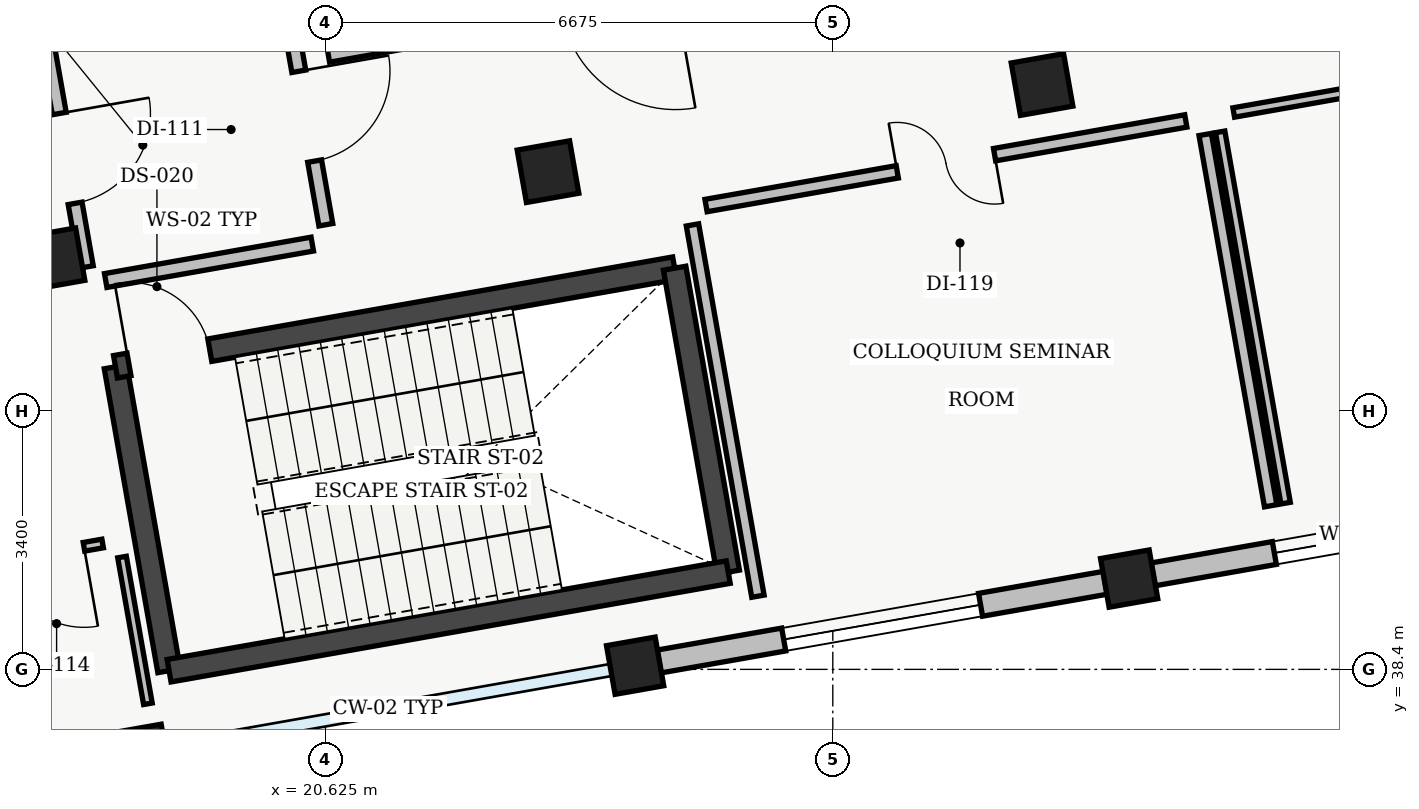
"""IFC4 building model, lengths in metres.
Left out: names, types, materials, properties, quantities, classifications, styles, units other than length and angle.
Written with IfcOpenShell. Run it as: python <this file> out.ifc"""

import sys

from ifc_helpers import new_model, si_unit, direction, frame, frame_2d, origin, origin_2d, place, context, subcontext, project, spatial, rectangle, extrude, element, fill, save


model = new_model("IFC4")
c1 = context("Model", 3, precision=1e-05, world=origin(), true_north=direction((0.0, 1.0)))
c2 = subcontext(c1, "Body", "Model", "MODEL_VIEW")
j1 = project(units=[si_unit("LENGTHUNIT", "METRE"), si_unit("PLANEANGLEUNIT", "RADIAN")], contexts=[c1])
p1 = place(None, origin())
s1 = spatial("IfcSite", under=j1, at=p1, CompositionType="ELEMENT")
p2 = place(p1, origin())
s2 = spatial("IfcBuilding", under=s1, at=p2, CompositionType="ELEMENT")
p3 = place(p2, frame((0.0, 0.0, 23.1)))
s3 = spatial("IfcBuildingStorey", under=s2, at=p3, CompositionType="ELEMENT", Elevation=23.1)
p4 = place(p3, frame((18.199, 37.302, 0.0), z_axis=(0.0, 0.0, 1.0), x_axis=(0.984807753012, 0.173648177667, 0.0)))
e1 = element("IfcColumn", 1, at=p4, inside=s3, PredefinedType="COLUMN", context=c2, shape_type="SweptSolid", body=[
    extrude(rectangle(XDim=0.65, YDim=0.65, at=origin_2d()), origin(), (0.0, 0.0, 1.0), 4.31),
])
p5 = place(p3, frame((17.053, 43.802, 0.0), z_axis=(0.0, 0.0, 1.0), x_axis=(0.984807753012, 0.173648177667, 0.0)))
e2 = element("IfcColumn", 2, at=p5, inside=s3, PredefinedType="COLUMN", context=c2, shape_type="SweptSolid", body=[
    extrude(rectangle(XDim=0.7, YDim=0.7, at=origin_2d()), origin(), (0.0, 0.0, 1.0), 4.31),
])
p6 = place(p3, frame((24.699, 38.448, 0.0), z_axis=(0.0, 0.0, 1.0), x_axis=(0.984807753012, 0.173648177667, 0.0)))
e3 = element("IfcColumn", 3, at=p6, inside=s3, PredefinedType="COLUMN", context=c2, shape_type="SweptSolid", body=[
    extrude(rectangle(XDim=0.65, YDim=0.65, at=origin_2d()), origin(), (0.0, 0.0, 1.0), 4.31),
])
p7 = place(p3, frame((23.553, 44.948, 0.0), z_axis=(0.0, 0.0, 1.0), x_axis=(0.984807753012, 0.173648177667, 0.0)))
e4 = element("IfcColumn", 4, at=p7, inside=s3, PredefinedType="COLUMN", context=c2, shape_type="SweptSolid", body=[
    extrude(rectangle(XDim=0.7, YDim=0.7, at=origin_2d()), origin(), (0.0, 0.0, 1.0), 4.31),
])
p8 = place(p3, frame((31.199, 39.594, 0.0), z_axis=(0.0, 0.0, 1.0), x_axis=(0.984807753012, 0.173648177667, 0.0)))
e5 = element("IfcColumn", 5, at=p8, inside=s3, PredefinedType="COLUMN", context=c2, shape_type="SweptSolid", body=[
    extrude(rectangle(XDim=0.65, YDim=0.65, at=origin_2d()), origin(), (0.0, 0.0, 1.0), 4.31),
])
p9 = place(p3, frame((30.053, 46.094, 0.0), z_axis=(0.0, 0.0, 1.0), x_axis=(0.984807753012, 0.173648177667, 0.0)))
e6 = element("IfcColumn", 6, at=p9, inside=s3, PredefinedType="COLUMN", context=c2, shape_type="SweptSolid", body=[
    extrude(rectangle(XDim=0.7, YDim=0.7, at=origin_2d()), origin(), (0.0, 0.0, 1.0), 4.31),
])
p10 = place(p3, frame((37.384, 40.685, 0.0), z_axis=(0.0, 0.0, 1.0), x_axis=(-0.98480829201, -0.173645120828, 0.0)))
e7 = element("IfcWall", 7, at=p10, inside=s3, PredefinedType="STANDARD", context=c2, shape_type="SweptSolid", body=[
    extrude(rectangle(XDim=5.96, YDim=0.305, at=frame_2d((2.98, 0.0))), origin(), (0.0, 0.0, 1.0), 3.795),
])
p11 = place(p10, frame((1.62, 0.0, 0.95)))
e8 = element("IfcOpeningElement", 8, at=p11, cuts=e7, PredefinedType="OPENING", context=c2, shape_type="SweptSolid", body=[
    extrude(rectangle(XDim=2.72, YDim=1.44, at=frame_2d((1.36, 0.72))), frame((0.0, 0.152, 0.0), z_axis=(0.0, -1.0, 0.0), x_axis=(1.0, 0.0, 0.0)), (0.0, 0.0, 1.0), 0.305),
])
p12 = place(p3, frame((30.884, 39.539, 0.0), z_axis=(0.0, 0.0, 1.0), x_axis=(-0.98480829201, -0.173645120828, 0.0)))
e9 = element("IfcWall", 9, at=p12, inside=s3, PredefinedType="STANDARD", context=c2, shape_type="SweptSolid", body=[
    extrude(rectangle(XDim=5.96, YDim=0.305, at=frame_2d((2.98, 0.0))), origin(), (0.0, 0.0, 1.0), 3.795),
])
p13 = place(p12, frame((1.665, 0.0, 0.95)))
e10 = element("IfcOpeningElement", 10, at=p13, cuts=e9, PredefinedType="OPENING", context=c2, shape_type="SweptSolid", body=[
    extrude(rectangle(XDim=2.63, YDim=1.42, at=frame_2d((1.315, 0.71))), frame((0.0, 0.152, 0.0), z_axis=(0.0, -1.0, 0.0), x_axis=(1.0, 0.0, 0.0)), (0.0, 0.0, 1.0), 0.305),
])
p14 = place(p3, frame((18.567, 38.383, 0.0), z_axis=(0.0, 0.0, 1.0), x_axis=(-0.173606946886, 0.984815022221, 0.0)))
e11 = element("IfcWall", 11, at=p14, inside=s3, PredefinedType="SHEAR", context=c2, shape_type="SweptSolid", body=[
    extrude(rectangle(XDim=4.06, YDim=0.3, at=frame_2d((2.03, 0.0))), origin(), (0.0, 0.0, 1.0), 4.28),
])
p15 = place(p3, frame((17.863, 42.381, 0.0), z_axis=(0.0, 0.0, 1.0), x_axis=(0.984808225754, 0.173645496596, 0.0)))
e12 = element("IfcWall", 12, at=p15, inside=s3, PredefinedType="SHEAR", context=c2, shape_type="SweptSolid", body=[
    extrude(rectangle(XDim=7.47, YDim=0.3, at=frame_2d((3.735, 0.0))), origin(), (0.0, 0.0, 1.0), 4.28),
])
p16 = place(p15, frame((0.18, 0.0, 0.0)))
e13 = element("IfcOpeningElement", 13, at=p16, cuts=e12, PredefinedType="OPENING", context=c2, shape_type="SweptSolid", body=[
    extrude(rectangle(XDim=1.08, YDim=2.15, at=frame_2d((0.54, 1.075))), frame((0.0, 0.15, 0.0), z_axis=(0.0, -1.0, 0.0), x_axis=(1.0, 0.0, 0.0)), (0.0, 0.0, 1.0), 0.3),
])
p17 = place(p3, frame((25.219, 43.678, 0.0), z_axis=(0.0, 0.0, 1.0), x_axis=(0.173665267602, -0.984804739443, 0.0)))
e14 = element("IfcWall", 14, at=p17, inside=s3, PredefinedType="SHEAR", context=c2, shape_type="SweptSolid", body=[
    extrude(rectangle(XDim=4.06, YDim=0.3, at=frame_2d((2.03, 0.0))), origin(), (0.0, 0.0, 1.0), 4.28),
])
p18 = place(p3, frame((25.924, 39.68, 0.0), z_axis=(0.0, 0.0, 1.0), x_axis=(-0.984809211193, -0.173639907711, 0.0)))
e15 = element("IfcWall", 15, at=p18, inside=s3, PredefinedType="SHEAR", context=c2, shape_type="SweptSolid", body=[
    extrude(rectangle(XDim=7.47, YDim=0.3, at=frame_2d((3.735, 0.0))), origin(), (0.0, 0.0, 1.0), 4.28),
])
p19 = place(p3, frame((17.733, 43.516, 0.0), z_axis=(0.0, 0.0, 1.0), x_axis=(0.984808483292, 0.173644035992, 0.0)))
e16 = element("IfcWall", 16, at=p19, inside=s3, PredefinedType="SOLIDWALL", context=c2, shape_type="SweptSolid", body=[
    extrude(rectangle(XDim=2.76, YDim=0.185, at=frame_2d((1.38, 0.0))), origin(), (0.0, 0.0, 1.0), 3.95),
])
p20 = place(p3, frame((20.63, 44.25, 0.0), z_axis=(0.0, 0.0, 1.0), x_axis=(-0.173621956536, 0.984812376145, 0.0)))
e17 = element("IfcWall", 17, at=p20, inside=s3, PredefinedType="SOLIDWALL", context=c2, shape_type="SweptSolid", body=[
    extrude(rectangle(XDim=3.41, YDim=0.185, at=frame_2d((1.705, 0.0))), origin(), (0.0, 0.0, 1.0), 3.95),
])
p21 = place(p20, frame((0.85, 0.0, 0.0)))
e18 = element("IfcOpeningElement", 18, at=p21, cuts=e17, PredefinedType="OPENING", context=c2, shape_type="SweptSolid", body=[
    extrude(rectangle(XDim=1.2, YDim=2.15, at=frame_2d((0.6, 1.075))), frame((0.0, 0.093, 0.0), z_axis=(0.0, -1.0, 0.0), x_axis=(1.0, 0.0, 0.0)), (0.0, 0.0, 1.0), 0.185),
])
p22 = place(p3, frame((16.886, 47.052, 0.0), z_axis=(0.0, 0.0, 1.0), x_axis=(0.173621956536, -0.984812376145, 0.0)))
e19 = element("IfcWall", 19, at=p22, inside=s3, PredefinedType="SOLIDWALL", context=c2, shape_type="SweptSolid", body=[
    extrude(rectangle(XDim=3.41, YDim=0.185, at=frame_2d((1.705, 0.0))), origin(), (0.0, 0.0, 1.0), 3.95),
])
p23 = place(p22, frame((1.36, 0.0, 0.0)))
e20 = element("IfcOpeningElement", 20, at=p23, cuts=e19, PredefinedType="OPENING", context=c2, shape_type="SweptSolid", body=[
    extrude(rectangle(XDim=1.2, YDim=2.15, at=frame_2d((0.6, 1.075))), frame((0.0, 0.093, 0.0), z_axis=(0.0, -1.0, 0.0), x_axis=(1.0, 0.0, 0.0)), (0.0, 0.0, 1.0), 0.185),
])
p24 = place(p3, frame((18.289, 37.948, 0.0), z_axis=(0.0, 0.0, 1.0), x_axis=(-0.173643211285, 0.984808628706, 0.0)))
e21 = element("IfcWall", 21, at=p24, inside=s3, PredefinedType="PARTITIONING", context=c2, shape_type="SweptSolid", body=[
    extrude(rectangle(XDim=1.96, YDim=0.115, at=frame_2d((0.98, 0.0))), origin(), (0.0, 0.0, 1.0), 3.695),
])
p25 = place(p3, frame((17.694, 40.056, 0.0), z_axis=(0.0, 0.0, 1.0), x_axis=(-0.984797734253, -0.173704987291, 0.0)))
e22 = element("IfcWall", 22, at=p25, inside=s3, PredefinedType="PARTITIONING", context=c2, shape_type="SweptSolid", body=[
    extrude(rectangle(XDim=1.56, YDim=0.115, at=frame_2d((0.78, 0.0))), origin(), (0.0, 0.0, 1.0), 3.95),
])
p26 = place(p25, frame((0.25, 0.0, 0.0)))
e23 = element("IfcOpeningElement", 23, at=p26, cuts=e22, PredefinedType="OPENING", context=c2, shape_type="SweptSolid", body=[
    extrude(rectangle(XDim=1.06, YDim=2.12, at=frame_2d((0.53, 1.06))), frame((0.0, 0.058, 0.0), z_axis=(0.0, -1.0, 0.0), x_axis=(1.0, 0.0, 0.0)), (0.0, 0.0, 1.0), 0.115),
])
p27 = place(p3, frame((20.665, 46.469, 0.0), z_axis=(0.0, 0.0, 1.0), x_axis=(0.984804455571, 0.173666877348, 0.0)))
e24 = element("IfcWall", 24, at=p27, inside=s3, PredefinedType="PARTITIONING", context=c2, shape_type="SweptSolid", body=[
    extrude(rectangle(XDim=7.76, YDim=0.165, at=frame_2d((3.88, 0.0))), origin(), (0.0, 0.0, 1.0), 3.845),
])
p28 = place(p27, frame((3.125, 0.0, 0.0)))
e25 = element("IfcOpeningElement", 25, at=p28, cuts=e24, PredefinedType="OPENING", context=c2, shape_type="SweptSolid", body=[
    extrude(rectangle(XDim=1.51, YDim=2.12, at=frame_2d((0.755, 1.06))), frame((0.0, 0.083, 0.0), z_axis=(0.0, -1.0, 0.0), x_axis=(1.0, 0.0, 0.0)), (0.0, 0.0, 1.0), 0.165),
])
p29 = place(p3, frame((33.061, 40.552, 0.0), z_axis=(0.0, 0.0, 1.0), x_axis=(-0.173658971256, 0.98480584975, 0.0)))
e26 = element("IfcWall", 26, at=p29, inside=s3, PredefinedType="PARTITIONING", context=c2, shape_type="SweptSolid", body=[
    extrude(rectangle(XDim=4.96, YDim=0.165, at=frame_2d((2.48, 0.0))), origin(), (0.0, 0.0, 1.0), 3.95),
])
p30 = place(p3, frame((31.945, 45.615, 0.0), z_axis=(0.0, 0.0, 1.0), x_axis=(-0.984809620557, -0.173637585958, 0.0)))
e27 = element("IfcWall", 27, at=p30, inside=s3, PredefinedType="PARTITIONING", context=c2, shape_type="SweptSolid", body=[
    extrude(rectangle(XDim=6.41, YDim=0.165, at=frame_2d((3.205, 0.0))), origin(), (0.0, 0.0, 1.0), 3.95),
])
p31 = place(p30, frame((2.555, 0.0, 0.0)))
e28 = element("IfcOpeningElement", 28, at=p31, cuts=e27, PredefinedType="OPENING", context=c2, shape_type="SweptSolid", body=[
    extrude(rectangle(XDim=1.3, YDim=2.18, at=frame_2d((0.65, 1.09))), frame((0.0, 0.083, 0.0), z_axis=(0.0, -1.0, 0.0), x_axis=(1.0, 0.0, 0.0)), (0.0, 0.0, 1.0), 0.165),
])
p32 = place(p3, frame((25.454, 44.247, 0.0), z_axis=(0.0, 0.0, 1.0), x_axis=(0.173658971256, -0.98480584975, 0.0)))
e29 = element("IfcWall", 29, at=p32, inside=s3, PredefinedType="PARTITIONING", context=c2, shape_type="SweptSolid", body=[
    extrude(rectangle(XDim=4.96, YDim=0.165, at=frame_2d((2.48, 0.0))), origin(), (0.0, 0.0, 1.0), 3.95),
])
p33 = place(p3, frame((42.581, 47.491, 0.0), z_axis=(0.0, 0.0, 1.0), x_axis=(-0.98480532288, -0.173661959067, 0.0)))
e30 = element("IfcWall", 30, at=p33, inside=s3, PredefinedType="PARTITIONING", context=c2, shape_type="SweptSolid", body=[
    extrude(rectangle(XDim=10.16, YDim=0.125, at=frame_2d((5.08, 0.0))), origin(), (0.0, 0.0, 1.0), 3.95),
])
p34 = place(p33, frame((3.688, 0.0, 0.0)))
e31 = element("IfcOpeningElement", 31, at=p34, cuts=e30, PredefinedType="OPENING", context=c2, shape_type="SweptSolid", body=[
    extrude(rectangle(XDim=0.94, YDim=2.12, at=frame_2d((0.47, 1.06))), frame((0.0, 0.062, 0.0), z_axis=(0.0, -1.0, 0.0), x_axis=(1.0, 0.0, 0.0)), (0.0, 0.0, 1.0), 0.125),
])
p35 = place(p3, frame((32.396, 45.472, 0.0), z_axis=(0.0, 0.0, 1.0), x_axis=(0.173650553511, -0.984807334084, 0.0)))
e32 = element("IfcWall", 32, at=p35, inside=s3, PredefinedType="PARTITIONING", context=c2, shape_type="SweptSolid", body=[
    extrude(rectangle(XDim=4.96, YDim=0.125, at=frame_2d((2.48, 0.0))), origin(), (0.0, 0.0, 1.0), 3.95),
])
p36 = place(p11, origin())
e33 = element("IfcWindow", 33, at=p36, inside=s3, PartitioningType="SINGLE_PANEL", PredefinedType="WINDOW", context=c2, shape_type="SweptSolid", body=[
    extrude(rectangle(XDim=2.72, YDim=1.44, at=frame_2d((1.36, 0.72))), frame((0.0, 0.03, 0.0), z_axis=(0.0, -1.0, 0.0), x_axis=(1.0, 0.0, 0.0)), (0.0, 0.0, 1.0), 0.06),
])
fill(e8, e33)
p37 = place(p13, origin())
e34 = element("IfcWindow", 34, at=p37, inside=s3, PartitioningType="SINGLE_PANEL", PredefinedType="WINDOW", context=c2, shape_type="SweptSolid", body=[
    extrude(rectangle(XDim=2.63, YDim=1.42, at=frame_2d((1.315, 0.71))), frame((0.0, 0.03, 0.0), z_axis=(0.0, -1.0, 0.0), x_axis=(1.0, 0.0, 0.0)), (0.0, 0.0, 1.0), 0.06),
])
fill(e10, e34)
p38 = place(p16, origin())
e35 = element("IfcDoor", 35, at=p38, inside=s3, OperationType="SINGLE_SWING_LEFT", PredefinedType="DOOR", context=c2, shape_type="SweptSolid", body=[
    extrude(rectangle(XDim=1.08, YDim=2.15, at=frame_2d((0.54, 1.075))), frame((0.0, 0.025, 0.0), z_axis=(0.0, -1.0, 0.0), x_axis=(1.0, 0.0, 0.0)), (0.0, 0.0, 1.0), 0.05),
])
fill(e13, e35)
p39 = place(p21, origin())
e36 = element("IfcDoor", 36, at=p39, inside=s3, OperationType="SINGLE_SWING_RIGHT", PredefinedType="DOOR", context=c2, shape_type="SweptSolid", body=[
    extrude(rectangle(XDim=1.2, YDim=2.15, at=frame_2d((0.6, 1.075))), frame((0.0, 0.025, 0.0), z_axis=(0.0, -1.0, 0.0), x_axis=(1.0, 0.0, 0.0)), (0.0, 0.0, 1.0), 0.05),
])
fill(e18, e36)
p40 = place(p23, origin())
e37 = element("IfcDoor", 37, at=p40, inside=s3, OperationType="SINGLE_SWING_LEFT", PredefinedType="DOOR", context=c2, shape_type="SweptSolid", body=[
    extrude(rectangle(XDim=1.2, YDim=2.15, at=frame_2d((0.6, 1.075))), frame((0.0, 0.025, 0.0), z_axis=(0.0, -1.0, 0.0), x_axis=(1.0, 0.0, 0.0)), (0.0, 0.0, 1.0), 0.05),
])
fill(e20, e37)
p41 = place(p26, origin())
e38 = element("IfcDoor", 38, at=p41, inside=s3, OperationType="SINGLE_SWING_LEFT", PredefinedType="DOOR", context=c2, shape_type="SweptSolid", body=[
    extrude(rectangle(XDim=1.06, YDim=2.12, at=frame_2d((0.53, 1.06))), frame((0.0, 0.025, 0.0), z_axis=(0.0, -1.0, 0.0), x_axis=(1.0, 0.0, 0.0)), (0.0, 0.0, 1.0), 0.05),
])
fill(e23, e38)
p42 = place(p31, origin())
e39 = element("IfcDoor", 39, at=p42, inside=s3, OperationType="DOUBLE_DOOR_SINGLE_SWING", PredefinedType="DOOR", context=c2, shape_type="SweptSolid", body=[
    extrude(rectangle(XDim=1.3, YDim=2.18, at=frame_2d((0.65, 1.09))), frame((0.0, 0.025, 0.0), z_axis=(0.0, -1.0, 0.0), x_axis=(1.0, 0.0, 0.0)), (0.0, 0.0, 1.0), 0.05),
])
fill(e28, e39)
save(model, sys.argv[1])
